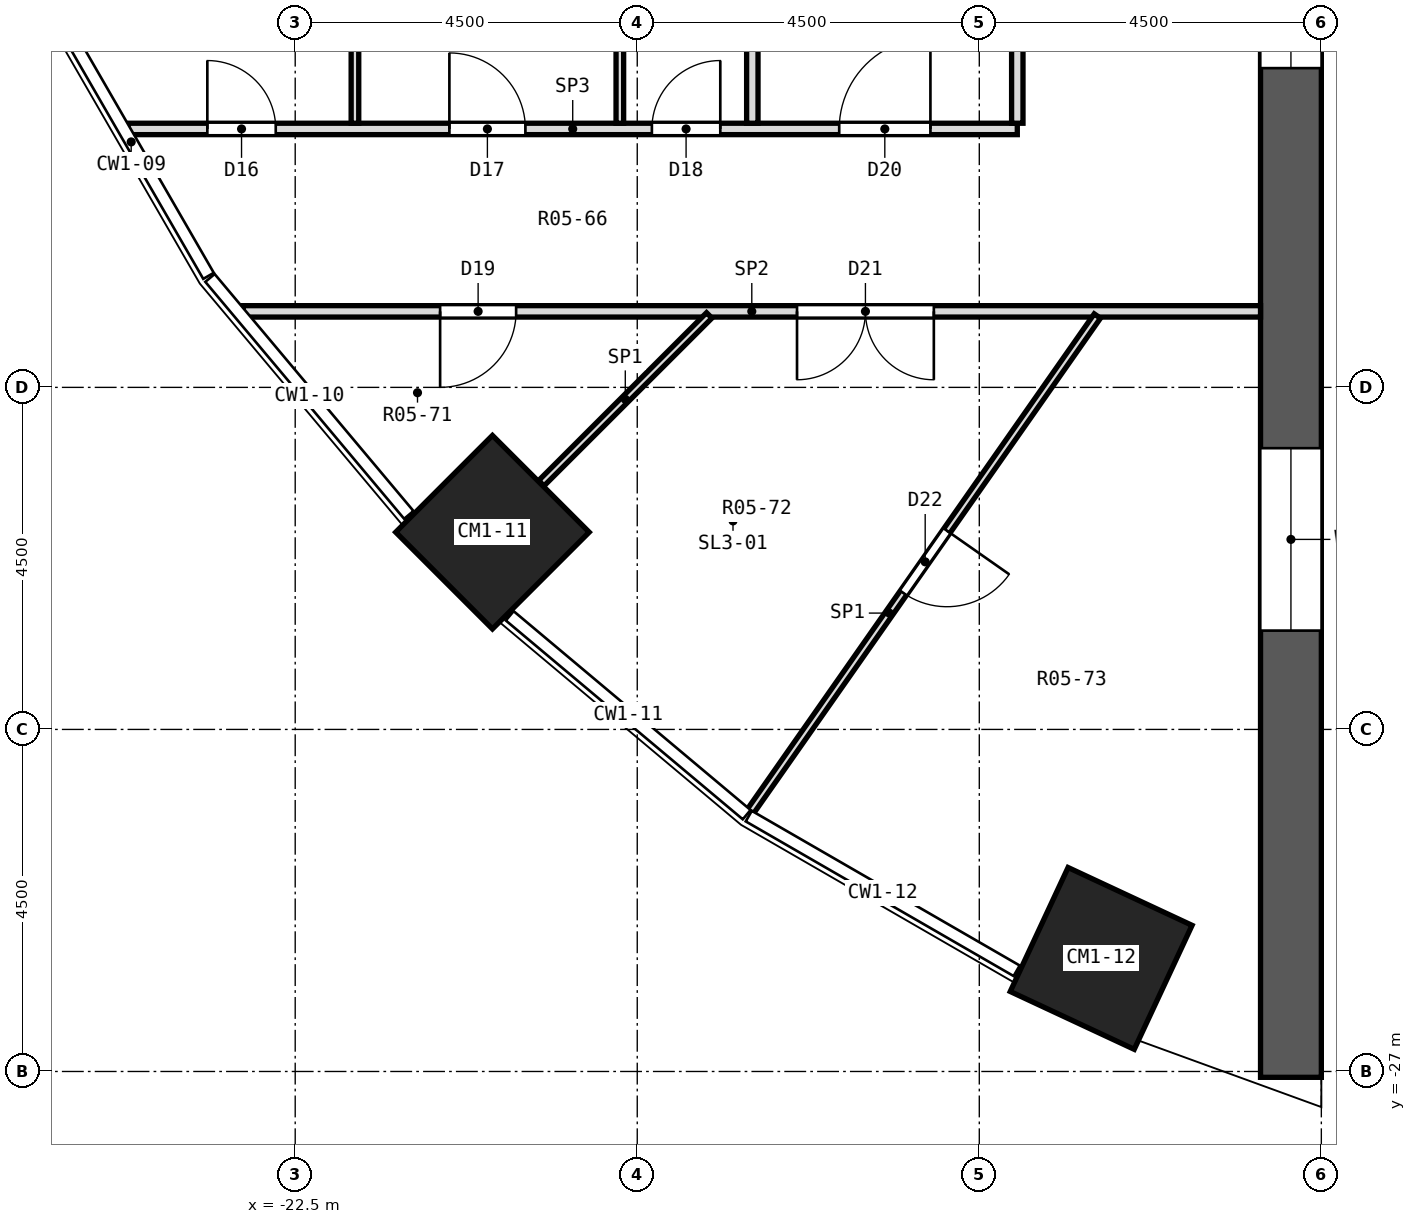
"""IFC4 building model, lengths in metres.
Left out: names, types, materials, properties, quantities, classifications, styles, units other than length and angle.
Written with IfcOpenShell. Run it as: python <this file> out.ifc"""

import sys

from ifc_helpers import new_model, si_unit, direction, frame, frame_2d, origin, origin_2d, place, context, subcontext, project, spatial, polyline, rectangle, outline, extrude, element, fill, save


model = new_model("IFC4")
c1 = context("Model", 3, precision=1e-05, world=origin(), true_north=direction((0.0, 1.0)))
c2 = subcontext(c1, "Body", "Model", "MODEL_VIEW")
j1 = project(units=[si_unit("LENGTHUNIT", "METRE"), si_unit("PLANEANGLEUNIT", "RADIAN")], contexts=[c1])
p1 = place(None, origin())
s1 = spatial("IfcSite", under=j1, at=p1, CompositionType="ELEMENT")
p2 = place(p1, origin())
s2 = spatial("IfcBuilding", under=s1, at=p2, CompositionType="ELEMENT")
p3 = place(p2, frame((0.0, 0.0, 9.2)))
s3 = spatial("IfcBuildingStorey", under=s2, at=p3, CompositionType="ELEMENT", Elevation=9.2)
for number, where, z_axis, x_axis in (
    (1, (-19.905, -19.905, 0.0), (0.0, 0.0, 1.0), (-0.707, -0.707, 0.0)),
    (2, (-11.897, -25.512, 0.0), (0.0, 0.0, 1.0), (-0.423, -0.906, 0.0)),
):
    element("IfcColumn", number, at=place(p3, frame(where, z_axis=z_axis, x_axis=x_axis)), inside=s3, PredefinedType="COLUMN", context=c2, shape_type="SweptSolid", body=[
        extrude(rectangle(XDim=1.8, YDim=1.8, at=origin_2d()), origin(), (0.0, 0.0, 1.0), 4.2),
    ])
p4 = place(p3, frame((-9.4, -27.077, 0.0), z_axis=(0.0, 0.0, 1.0), x_axis=(0.0, 1.0, 0.0)))
e3 = element("IfcWall", 3, at=p4, inside=s3, PredefinedType="SHEAR", context=c2, shape_type="SweptSolid", body=[
    extrude(rectangle(XDim=54.154, YDim=0.8, at=frame_2d((27.077, 0.0))), origin(), (0.0, 0.0, 1.0), 4.2),
])
p5 = place(p4, frame((13.277, 0.0, 0.9)))
e4 = element("IfcOpeningElement", 4, at=p5, cuts=e3, PredefinedType="OPENING", context=c2, shape_type="SweptSolid", body=[
    extrude(rectangle(XDim=2.4, YDim=2.1, at=frame_2d((1.2, 1.05))), frame((0.0, 0.412, 0.0), z_axis=(0.0, -1.0, 0.0), x_axis=(1.0, 0.0, 0.0)), (0.0, 0.0, 1.0), 0.824),
])
p6 = place(p4, frame((17.877, 0.0, 0.9)))
e5 = element("IfcOpeningElement", 5, at=p6, cuts=e3, PredefinedType="OPENING", context=c2, shape_type="SweptSolid", body=[
    extrude(rectangle(XDim=2.4, YDim=2.1, at=frame_2d((1.2, 1.05))), frame((0.0, 0.412, 0.0), z_axis=(0.0, -1.0, 0.0), x_axis=(1.0, 0.0, 0.0)), (0.0, 0.0, 1.0), 0.824),
])
p7 = place(p4, frame((22.477, 0.0, 0.9)))
e6 = element("IfcOpeningElement", 6, at=p7, cuts=e3, PredefinedType="OPENING", context=c2, shape_type="SweptSolid", body=[
    extrude(rectangle(XDim=2.4, YDim=2.1, at=frame_2d((1.2, 1.05))), frame((0.0, 0.412, 0.0), z_axis=(0.0, -1.0, 0.0), x_axis=(1.0, 0.0, 0.0)), (0.0, 0.0, 1.0), 0.824),
])
p8 = place(p4, frame((29.277, 0.0, 0.9)))
e7 = element("IfcOpeningElement", 7, at=p8, cuts=e3, PredefinedType="OPENING", context=c2, shape_type="SweptSolid", body=[
    extrude(rectangle(XDim=2.4, YDim=2.1, at=frame_2d((1.2, 1.05))), frame((0.0, 0.412, 0.0), z_axis=(0.0, -1.0, 0.0), x_axis=(1.0, 0.0, 0.0)), (0.0, 0.0, 1.0), 0.824),
])
p9 = place(p4, frame((33.877, 0.0, 0.9)))
e8 = element("IfcOpeningElement", 8, at=p9, cuts=e3, PredefinedType="OPENING", context=c2, shape_type="SweptSolid", body=[
    extrude(rectangle(XDim=2.4, YDim=2.1, at=frame_2d((1.2, 1.05))), frame((0.0, 0.412, 0.0), z_axis=(0.0, -1.0, 0.0), x_axis=(1.0, 0.0, 0.0)), (0.0, 0.0, 1.0), 0.824),
])
p10 = place(p4, frame((38.477, 0.0, 0.9)))
e9 = element("IfcOpeningElement", 9, at=p10, cuts=e3, PredefinedType="OPENING", context=c2, shape_type="SweptSolid", body=[
    extrude(rectangle(XDim=2.4, YDim=2.1, at=frame_2d((1.2, 1.05))), frame((0.0, 0.412, 0.0), z_axis=(0.0, -1.0, 0.0), x_axis=(1.0, 0.0, 0.0)), (0.0, 0.0, 1.0), 0.824),
])
p11 = place(p4, frame((5.877, 0.0, 0.9)))
e10 = element("IfcOpeningElement", 10, at=p11, cuts=e3, PredefinedType="OPENING", context=c2, shape_type="SweptSolid", body=[
    extrude(rectangle(XDim=2.4, YDim=2.1, at=frame_2d((1.2, 1.05))), frame((0.0, 0.412, 0.0), z_axis=(0.0, -1.0, 0.0), x_axis=(1.0, 0.0, 0.0)), (0.0, 0.0, 1.0), 0.824),
])
p12 = place(p4, frame((45.877, 0.0, 0.9)))
e11 = element("IfcOpeningElement", 11, at=p12, cuts=e3, PredefinedType="OPENING", context=c2, shape_type="SweptSolid", body=[
    extrude(rectangle(XDim=2.4, YDim=2.1, at=frame_2d((1.2, 1.05))), frame((0.0, 0.412, 0.0), z_axis=(0.0, -1.0, 0.0), x_axis=(1.0, 0.0, 0.0)), (0.0, 0.0, 1.0), 0.824),
])
p13 = place(p3, frame((-11.634, -26.49, 0.0), z_axis=(-0.342051555154, -0.93967909211, 0.001984305274), x_axis=(0.000667381896, 0.001868746859, 0.999998031191)))
e12 = element("IfcWall", 12, at=p13, inside=s3, PredefinedType="SOLIDWALL", context=c2, shape_type="SweptSolid", body=[
    extrude(outline(polyline([(0.0, 0.0), (3.65, -4.743e-20), (3.65, -2.81), (4.2, -2.81), (4.2, -3.467), (3.719, -3.211), (2.622, -2.727), (1.495, -2.328), (0.343, -2.015), (-2.335e-05, -1.949), (0.0, 0.0)])), origin(), (0.0, 0.0, -1.0), 0.38),
])
p14 = place(p3, frame((-23.187, -17.0, 0.0), z_axis=(0.0, 0.0, 1.0), x_axis=(1.0, 0.0, 0.0)))
e13 = element("IfcWall", 13, at=p14, inside=s3, PredefinedType="PARTITIONING", context=c2, shape_type="SweptSolid", body=[
    extrude(rectangle(XDim=13.387, YDim=0.15, at=frame_2d((6.693, 0.0))), origin(), (0.0, 0.0, 1.0), 3.65),
])
p15 = place(p14, frame((2.594, 0.0, 0.0)))
e14 = element("IfcOpeningElement", 14, at=p15, cuts=e13, PredefinedType="OPENING", context=c2, shape_type="SweptSolid", body=[
    extrude(rectangle(XDim=1.0, YDim=2.1, at=frame_2d((0.5, 1.05))), frame((0.0, 0.087, 0.0), z_axis=(0.0, -1.0, 0.0), x_axis=(1.0, 0.0, 0.0)), (0.0, 0.0, 1.0), 0.174),
])
p16 = place(p14, frame((7.289, 0.0, 0.0)))
e15 = element("IfcOpeningElement", 15, at=p16, cuts=e13, PredefinedType="OPENING", context=c2, shape_type="SweptSolid", body=[
    extrude(rectangle(XDim=1.8, YDim=2.1, at=frame_2d((0.9, 1.05))), frame((0.0, 0.087, 0.0), z_axis=(0.0, -1.0, 0.0), x_axis=(1.0, 0.0, 0.0)), (0.0, 0.0, 1.0), 0.174),
])
p17 = place(p3, frame((-24.698, -14.6, 0.0), z_axis=(0.0, 0.0, 1.0), x_axis=(1.0, 0.0, 0.0)))
e16 = element("IfcWall", 16, at=p17, inside=s3, PredefinedType="PARTITIONING", context=c2, shape_type="SweptSolid", body=[
    extrude(rectangle(XDim=11.698, YDim=0.15, at=frame_2d((5.849, 0.0))), origin(), (0.0, 0.0, 1.0), 3.65),
])
p18 = place(p17, frame((1.042, 0.0, 0.0)))
e17 = element("IfcOpeningElement", 17, at=p18, cuts=e16, PredefinedType="OPENING", context=c2, shape_type="SweptSolid", body=[
    extrude(rectangle(XDim=0.9, YDim=2.1, at=frame_2d((0.45, 1.05))), frame((0.0, 0.087, 0.0), z_axis=(0.0, -1.0, 0.0), x_axis=(1.0, 0.0, 0.0)), (0.0, 0.0, 1.0), 0.174),
])
p19 = place(p17, frame((4.227, 0.0, 0.0)))
e18 = element("IfcOpeningElement", 18, at=p19, cuts=e16, PredefinedType="OPENING", context=c2, shape_type="SweptSolid", body=[
    extrude(rectangle(XDim=1.0, YDim=2.1, at=frame_2d((0.5, 1.05))), frame((0.0, 0.087, 0.0), z_axis=(0.0, -1.0, 0.0), x_axis=(1.0, 0.0, 0.0)), (0.0, 0.0, 1.0), 0.174),
])
p20 = place(p17, frame((6.89, 0.0, 0.0)))
e19 = element("IfcOpeningElement", 19, at=p20, cuts=e16, PredefinedType="OPENING", context=c2, shape_type="SweptSolid", body=[
    extrude(rectangle(XDim=0.9, YDim=2.1, at=frame_2d((0.45, 1.05))), frame((0.0, 0.087, 0.0), z_axis=(0.0, -1.0, 0.0), x_axis=(1.0, 0.0, 0.0)), (0.0, 0.0, 1.0), 0.174),
])
p21 = place(p17, frame((9.355, 0.0, 0.0)))
e20 = element("IfcOpeningElement", 20, at=p21, cuts=e16, PredefinedType="OPENING", context=c2, shape_type="SweptSolid", body=[
    extrude(rectangle(XDim=1.2, YDim=2.1, at=frame_2d((0.6, 1.05))), frame((0.0, 0.087, 0.0), z_axis=(0.0, -1.0, 0.0), x_axis=(1.0, 0.0, 0.0)), (0.0, 0.0, 1.0), 0.174),
])
p22 = place(p3, frame((-19.262, -19.261, 0.0), z_axis=(0.0, 0.0, 1.0), x_axis=(0.707302163116, 0.706911345256, 0.0)))
e21 = element("IfcWall", 21, at=p22, inside=s3, PredefinedType="PARTITIONING", context=c2, shape_type="SweptSolid", body=[
    extrude(rectangle(XDim=3.124, YDim=0.1, at=frame_2d((1.562, 0.0))), origin(), (0.0, 0.0, 1.0), 3.65),
])
p23 = place(p3, frame((-16.52, -23.591, 0.0), z_axis=(0.0, 0.0, 1.0), x_axis=(0.573630888732, 0.819113913624, 0.0)))
e22 = element("IfcWall", 22, at=p23, inside=s3, PredefinedType="PARTITIONING", context=c2, shape_type="SweptSolid", body=[
    extrude(rectangle(XDim=7.971, YDim=0.1, at=frame_2d((3.986, 0.0))), origin(), (0.0, 0.0, 1.0), 3.65),
])
p24 = place(p23, frame((3.523, 0.0, 0.0)))
e23 = element("IfcOpeningElement", 23, at=p24, cuts=e22, PredefinedType="OPENING", context=c2, shape_type="SweptSolid", body=[
    extrude(rectangle(XDim=1.0, YDim=2.1, at=frame_2d((0.5, 1.05))), frame((0.0, 0.062, 0.0), z_axis=(0.0, -1.0, 0.0), x_axis=(1.0, 0.0, 0.0)), (0.0, 0.0, 1.0), 0.124),
])
for number, where, z_axis, x_axis in (
    (24, (-13.0, -14.525, 0.0), (0.0, 0.0, 1.0), (0.0, 1.0, 0.0)),
    (25, (-16.486, -14.525, 0.0), (0.0, 0.0, 1.0), (0.0, 1.0, 0.0)),
):
    element("IfcWall", number, at=place(p3, frame(where, z_axis=z_axis, x_axis=x_axis)), inside=s3, PredefinedType="PARTITIONING", context=c2, shape_type="SweptSolid", body=[
        extrude(rectangle(XDim=5.025, YDim=0.15, at=frame_2d((2.512, 0.0))), origin(), (0.0, 0.0, 1.0), 3.65),
    ])
for number, where, z_axis, x_axis in (
    (26, (-18.229, -14.525, 0.0), (0.0, 0.0, 1.0), (0.0, 1.0, 0.0)),
    (27, (-21.714, -14.525, 0.0), (0.0, 0.0, 1.0), (0.0, 1.0, 0.0)),
):
    element("IfcWall", number, at=place(p3, frame(where, z_axis=z_axis, x_axis=x_axis)), inside=s3, PredefinedType="PARTITIONING", context=c2, shape_type="SweptSolid", body=[
        extrude(rectangle(XDim=5.025, YDim=0.1, at=frame_2d((2.512, 0.0))), origin(), (0.0, 0.0, 1.0), 3.65),
    ])
p25 = place(p18, origin())
e28 = element("IfcDoor", 28, at=p25, inside=s3, OperationType="SINGLE_SWING_LEFT", PredefinedType="DOOR", context=c2, shape_type="SweptSolid", body=[
    extrude(rectangle(XDim=0.9, YDim=2.1, at=frame_2d((0.45, 1.05))), frame((0.0, 0.025, 0.0), z_axis=(0.0, -1.0, 0.0), x_axis=(1.0, 0.0, 0.0)), (0.0, 0.0, 1.0), 0.05),
])
fill(e17, e28)
p26 = place(p19, origin())
e29 = element("IfcDoor", 29, at=p26, inside=s3, OperationType="SINGLE_SWING_LEFT", PredefinedType="DOOR", context=c2, shape_type="SweptSolid", body=[
    extrude(rectangle(XDim=1.0, YDim=2.1, at=frame_2d((0.5, 1.05))), frame((0.0, 0.025, 0.0), z_axis=(0.0, -1.0, 0.0), x_axis=(1.0, 0.0, 0.0)), (0.0, 0.0, 1.0), 0.05),
])
fill(e18, e29)
p27 = place(p20, origin())
e30 = element("IfcDoor", 30, at=p27, inside=s3, OperationType="SINGLE_SWING_RIGHT", PredefinedType="DOOR", context=c2, shape_type="SweptSolid", body=[
    extrude(rectangle(XDim=0.9, YDim=2.1, at=frame_2d((0.45, 1.05))), frame((0.0, 0.025, 0.0), z_axis=(0.0, -1.0, 0.0), x_axis=(1.0, 0.0, 0.0)), (0.0, 0.0, 1.0), 0.05),
])
fill(e19, e30)
p28 = place(p15, frame((1.0, 0.0, 0.0), z_axis=(0.0, 0.0, 1.0), x_axis=(-1.0, 0.0, 0.0)))
e31 = element("IfcDoor", 31, at=p28, inside=s3, OperationType="SINGLE_SWING_RIGHT", PredefinedType="DOOR", context=c2, shape_type="SweptSolid", body=[
    extrude(rectangle(XDim=1.0, YDim=2.1, at=frame_2d((0.5, 1.05))), frame((0.0, 0.025, 0.0), z_axis=(0.0, -1.0, 0.0), x_axis=(1.0, 0.0, 0.0)), (0.0, 0.0, 1.0), 0.05),
])
fill(e14, e31)
p29 = place(p21, origin())
e32 = element("IfcDoor", 32, at=p29, inside=s3, OperationType="SINGLE_SWING_RIGHT", PredefinedType="DOOR", context=c2, shape_type="SweptSolid", body=[
    extrude(rectangle(XDim=1.2, YDim=2.1, at=frame_2d((0.6, 1.05))), frame((0.0, 0.025, 0.0), z_axis=(0.0, -1.0, 0.0), x_axis=(1.0, 0.0, 0.0)), (0.0, 0.0, 1.0), 0.05),
])
fill(e20, e32)
p30 = place(p16, frame((1.8, 0.0, 0.0), z_axis=(0.0, 0.0, 1.0), x_axis=(-1.0, 0.0, 0.0)))
e33 = element("IfcDoor", 33, at=p30, inside=s3, OperationType="DOUBLE_DOOR_SINGLE_SWING", PredefinedType="DOOR", context=c2, shape_type="SweptSolid", body=[
    extrude(rectangle(XDim=1.8, YDim=2.1, at=frame_2d((0.9, 1.05))), frame((0.0, 0.025, 0.0), z_axis=(0.0, -1.0, 0.0), x_axis=(1.0, 0.0, 0.0)), (0.0, 0.0, 1.0), 0.05),
])
fill(e15, e33)
p31 = place(p24, frame((1.0, 0.0, 0.0), z_axis=(0.0, 0.0, 1.0), x_axis=(-1.0, 0.0, 0.0)))
e34 = element("IfcDoor", 34, at=p31, inside=s3, OperationType="SINGLE_SWING_LEFT", PredefinedType="DOOR", context=c2, shape_type="SweptSolid", body=[
    extrude(rectangle(XDim=1.0, YDim=2.1, at=frame_2d((0.5, 1.05))), frame((0.0, 0.025, 0.0), z_axis=(0.0, -1.0, 0.0), x_axis=(1.0, 0.0, 0.0)), (0.0, 0.0, 1.0), 0.05),
])
fill(e23, e34)
p32 = place(p5, origin())
e35 = element("IfcWindow", 35, at=p32, inside=s3, PartitioningType="SINGLE_PANEL", PredefinedType="WINDOW", context=c2, shape_type="SweptSolid", body=[
    extrude(rectangle(XDim=2.4, YDim=2.1, at=frame_2d((1.2, 1.05))), frame((0.0, 0.03, 0.0), z_axis=(0.0, -1.0, 0.0), x_axis=(1.0, 0.0, 0.0)), (0.0, 0.0, 1.0), 0.06),
])
fill(e4, e35)
p33 = place(p11, origin())
e36 = element("IfcWindow", 36, at=p33, inside=s3, PartitioningType="SINGLE_PANEL", PredefinedType="WINDOW", context=c2, shape_type="SweptSolid", body=[
    extrude(rectangle(XDim=2.4, YDim=2.1, at=frame_2d((1.2, 1.05))), frame((0.0, 0.03, 0.0), z_axis=(0.0, -1.0, 0.0), x_axis=(1.0, 0.0, 0.0)), (0.0, 0.0, 1.0), 0.06),
])
fill(e10, e36)
save(model, sys.argv[1])
